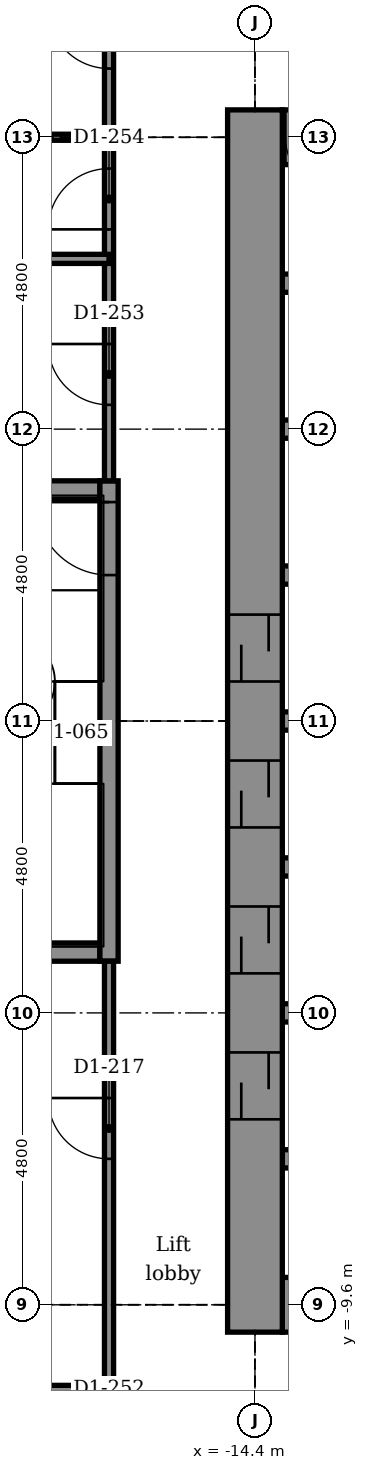
"""IFC4 building model, lengths in metres.
Left out: names, types, materials, properties, quantities, classifications, styles, units other than length and angle.
Written with IfcOpenShell. Run it as: python <this file> out.ifc"""

import sys

from ifc_helpers import new_model, si_unit, direction, frame, frame_2d, origin, place, context, subcontext, project, spatial, rectangle, extrude, element, fill, save


model = new_model("IFC4")
c1 = context("Model", 3, precision=1e-05, world=origin(), true_north=direction((0.0, 1.0)))
c2 = subcontext(c1, "Body", "Model", "MODEL_VIEW")
j1 = project(units=[si_unit("LENGTHUNIT", "METRE"), si_unit("PLANEANGLEUNIT", "RADIAN")], contexts=[c1])
p1 = place(None, origin())
s1 = spatial("IfcSite", under=j1, at=p1, CompositionType="ELEMENT")
p2 = place(p1, origin())
s2 = spatial("IfcBuilding", under=s1, at=p2, CompositionType="ELEMENT")
p3 = place(p2, frame((0.0, 0.0, 91.4)))
s3 = spatial("IfcBuildingStorey", under=s2, at=p3, CompositionType="ELEMENT", Elevation=91.4)
p4 = place(p3, frame((-13.95, -9.6, -0.2), z_axis=(0.0, 0.0, 1.0), x_axis=(1.0, 0.0, 0.0)))
e1 = element("IfcWall", 1, at=p4, inside=s3, PredefinedType="SHEAR", context=c2, shape_type="SweptSolid", body=[
    extrude(rectangle(XDim=3.9, YDim=0.9, at=frame_2d((1.95, 0.0))), origin(), (0.0, 0.0, 1.0), 4.5),
])
p5 = place(p4, frame((1.5, 0.0, 0.2)))
e2 = element("IfcOpeningElement", 2, at=p5, cuts=e1, PredefinedType="OPENING", context=c2, shape_type="SweptSolid", body=[
    extrude(rectangle(XDim=0.9, YDim=2.1, at=frame_2d((0.45, 1.05))), frame((0.0, 0.46, 0.0), z_axis=(0.0, -1.0, 0.0), x_axis=(1.0, 0.0, 0.0)), (0.0, 0.0, 1.0), 0.92),
])
for number, where, z_axis, x_axis in (
    (3, (-13.95, -7.2, -0.2), (0.0, 0.0, 1.0), (1.0, 0.0, 0.0)),
    (4, (-13.95, -4.8, -0.2), (0.0, 0.0, 1.0), (1.0, 0.0, 0.0)),
):
    element("IfcWall", number, at=place(p3, frame(where, z_axis=z_axis, x_axis=x_axis)), inside=s3, PredefinedType="STANDARD", context=c2, shape_type="SweptSolid", body=[
        extrude(rectangle(XDim=3.9, YDim=0.3, at=frame_2d((1.95, 0.0))), origin(), (0.0, 0.0, 1.0), 4.5),
    ])
p6 = place(p3, frame((-21.45, -3.8, -0.2), z_axis=(0.0, 0.0, 1.0), x_axis=(1.0, 0.0, 0.0)))
e5 = element("IfcWall", 5, at=p6, inside=s3, PredefinedType="STANDARD", context=c2, shape_type="SweptSolid", body=[
    extrude(rectangle(XDim=4.5, YDim=0.3, at=frame_2d((2.25, 0.0))), origin(), (0.0, 0.0, 1.0), 4.5),
])
for number, where, z_axis, x_axis in (
    (6, (-13.95, -2.4, -0.2), (0.0, 0.0, 1.0), (1.0, 0.0, 0.0)),
    (7, (-13.95, 0.0, -0.2), (0.0, 0.0, 1.0), (1.0, 0.0, 0.0)),
    (8, (-13.95, 2.4, -0.2), (0.0, 0.0, 1.0), (1.0, 0.0, 0.0)),
):
    element("IfcWall", number, at=place(p3, frame(where, z_axis=z_axis, x_axis=x_axis)), inside=s3, PredefinedType="STANDARD", context=c2, shape_type="SweptSolid", body=[
        extrude(rectangle(XDim=2.8, YDim=0.3, at=frame_2d((1.4, 0.0))), origin(), (0.0, 0.0, 1.0), 4.5),
    ])
p7 = place(p3, frame((-21.45, 3.8, -0.2), z_axis=(0.0, 0.0, 1.0), x_axis=(1.0, 0.0, 0.0)))
e9 = element("IfcWall", 9, at=p7, inside=s3, PredefinedType="STANDARD", context=c2, shape_type="SweptSolid", body=[
    extrude(rectangle(XDim=4.5, YDim=0.3, at=frame_2d((2.25, 0.0))), origin(), (0.0, 0.0, 1.0), 4.5),
])
for number, where, z_axis, x_axis in (
    (10, (-13.95, 4.8, -0.2), (0.0, 0.0, 1.0), (1.0, 0.0, 0.0)),
    (11, (-13.95, 7.2, -0.2), (0.0, 0.0, 1.0), (1.0, 0.0, 0.0)),
):
    element("IfcWall", number, at=place(p3, frame(where, z_axis=z_axis, x_axis=x_axis)), inside=s3, PredefinedType="STANDARD", context=c2, shape_type="SweptSolid", body=[
        extrude(rectangle(XDim=3.9, YDim=0.3, at=frame_2d((1.95, 0.0))), origin(), (0.0, 0.0, 1.0), 4.5),
    ])
p8 = place(p3, frame((-13.95, 9.6, -0.2), z_axis=(0.0, 0.0, 1.0), x_axis=(1.0, 0.0, 0.0)))
e12 = element("IfcWall", 12, at=p8, inside=s3, PredefinedType="SHEAR", context=c2, shape_type="SweptSolid", body=[
    extrude(rectangle(XDim=3.9, YDim=0.9, at=frame_2d((1.95, 0.0))), origin(), (0.0, 0.0, 1.0), 4.5),
])
p9 = place(p8, frame((0.05, 0.0, 0.2)))
e13 = element("IfcOpeningElement", 13, at=p9, cuts=e12, PredefinedType="OPENING", context=c2, shape_type="SweptSolid", body=[
    extrude(rectangle(XDim=0.9, YDim=2.1, at=frame_2d((0.45, 1.05))), frame((0.0, 0.46, 0.0), z_axis=(0.0, -1.0, 0.0), x_axis=(1.0, 0.0, 0.0)), (0.0, 0.0, 1.0), 0.92),
])
p10 = place(p8, frame((1.5, 0.0, 0.2)))
e14 = element("IfcOpeningElement", 14, at=p10, cuts=e12, PredefinedType="OPENING", context=c2, shape_type="SweptSolid", body=[
    extrude(rectangle(XDim=0.9, YDim=2.1, at=frame_2d((0.45, 1.05))), frame((0.0, 0.46, 0.0), z_axis=(0.0, -1.0, 0.0), x_axis=(1.0, 0.0, 0.0)), (0.0, 0.0, 1.0), 0.92),
])
p11 = place(p8, frame((2.95, 0.0, 0.2)))
e15 = element("IfcOpeningElement", 15, at=p11, cuts=e12, PredefinedType="OPENING", context=c2, shape_type="SweptSolid", body=[
    extrude(rectangle(XDim=0.9, YDim=2.1, at=frame_2d((0.45, 1.05))), frame((0.0, 0.46, 0.0), z_axis=(0.0, -1.0, 0.0), x_axis=(1.0, 0.0, 0.0)), (0.0, 0.0, 1.0), 0.92),
])
p12 = place(p3, frame((-16.8, -3.95, -0.2), z_axis=(0.0, 0.0, 1.0), x_axis=(0.0, 1.0, 0.0)))
e16 = element("IfcWall", 16, at=p12, inside=s3, PredefinedType="STANDARD", context=c2, shape_type="SweptSolid", body=[
    extrude(rectangle(XDim=7.9, YDim=0.3, at=frame_2d((3.95, 0.0))), origin(), (0.0, 0.0, 1.0), 4.5),
])
p13 = place(p12, frame((6.35, 0.0, 0.2)))
e17 = element("IfcOpeningElement", 17, at=p13, cuts=e16, PredefinedType="OPENING", context=c2, shape_type="SweptSolid", body=[
    extrude(rectangle(XDim=1.2, YDim=2.1, at=frame_2d((0.6, 1.05))), frame((0.0, 0.16, 0.0), z_axis=(0.0, -1.0, 0.0), x_axis=(1.0, 0.0, 0.0)), (0.0, 0.0, 1.0), 0.32),
])
p14 = place(p3, frame((-14.4, -10.05, -0.2), z_axis=(0.0, 0.0, 1.0), x_axis=(0.0, 1.0, 0.0)))
e18 = element("IfcWall", 18, at=p14, inside=s3, PredefinedType="SHEAR", context=c2, shape_type="SweptSolid", body=[
    extrude(rectangle(XDim=20.1, YDim=0.9, at=frame_2d((10.05, 0.0))), origin(), (0.0, 0.0, 1.0), 4.5),
])
p15 = place(p14, frame((3.5, 0.0, 0.2)))
e19 = element("IfcOpeningElement", 19, at=p15, cuts=e18, PredefinedType="OPENING", context=c2, shape_type="SweptSolid", body=[
    extrude(rectangle(XDim=1.1, YDim=2.1, at=frame_2d((0.55, 1.05))), frame((0.0, 0.46, 0.0), z_axis=(0.0, -1.0, 0.0), x_axis=(1.0, 0.0, 0.0)), (0.0, 0.0, 1.0), 0.92),
])
p16 = place(p14, frame((5.9, 0.0, 0.2)))
e20 = element("IfcOpeningElement", 20, at=p16, cuts=e18, PredefinedType="OPENING", context=c2, shape_type="SweptSolid", body=[
    extrude(rectangle(XDim=1.1, YDim=2.1, at=frame_2d((0.55, 1.05))), frame((0.0, 0.46, 0.0), z_axis=(0.0, -1.0, 0.0), x_axis=(1.0, 0.0, 0.0)), (0.0, 0.0, 1.0), 0.92),
])
p17 = place(p14, frame((8.3, 0.0, 0.2)))
e21 = element("IfcOpeningElement", 21, at=p17, cuts=e18, PredefinedType="OPENING", context=c2, shape_type="SweptSolid", body=[
    extrude(rectangle(XDim=1.1, YDim=2.1, at=frame_2d((0.55, 1.05))), frame((0.0, 0.46, 0.0), z_axis=(0.0, -1.0, 0.0), x_axis=(1.0, 0.0, 0.0)), (0.0, 0.0, 1.0), 0.92),
])
p18 = place(p14, frame((10.7, 0.0, 0.2)))
e22 = element("IfcOpeningElement", 22, at=p18, cuts=e18, PredefinedType="OPENING", context=c2, shape_type="SweptSolid", body=[
    extrude(rectangle(XDim=1.1, YDim=2.1, at=frame_2d((0.55, 1.05))), frame((0.0, 0.46, 0.0), z_axis=(0.0, -1.0, 0.0), x_axis=(1.0, 0.0, 0.0)), (0.0, 0.0, 1.0), 0.92),
])
p19 = place(p3, frame((-16.8, -13.0, 0.0), z_axis=(0.0, 0.0, 1.0), x_axis=(0.0, 1.0, 0.0)))
e23 = element("IfcWall", 23, at=p19, inside=s3, PredefinedType="PARTITIONING", context=c2, shape_type="SweptSolid", body=[
    extrude(rectangle(XDim=9.05, YDim=0.15, at=frame_2d((4.525, 0.0))), origin(), (0.0, 0.0, 1.0), 4.3),
])
p20 = place(p19, frame((0.515, 0.0, 0.0)))
e24 = element("IfcOpeningElement", 24, at=p20, cuts=e23, PredefinedType="OPENING", context=c2, shape_type="SweptSolid", body=[
    extrude(rectangle(XDim=1.0, YDim=2.1, at=frame_2d((0.5, 1.05))), frame((0.0, 0.085, 0.0), z_axis=(0.0, -1.0, 0.0), x_axis=(1.0, 0.0, 0.0)), (0.0, 0.0, 1.0), 0.17),
])
p21 = place(p19, frame((5.8, 0.0, 0.0)))
e25 = element("IfcOpeningElement", 25, at=p21, cuts=e23, PredefinedType="OPENING", context=c2, shape_type="SweptSolid", body=[
    extrude(rectangle(XDim=1.0, YDim=2.1, at=frame_2d((0.5, 1.05))), frame((0.0, 0.085, 0.0), z_axis=(0.0, -1.0, 0.0), x_axis=(1.0, 0.0, 0.0)), (0.0, 0.0, 1.0), 0.17),
])
p22 = place(p3, frame((-16.8, 3.95, 0.0), z_axis=(0.0, 0.0, 1.0), x_axis=(0.0, 1.0, 0.0)))
e26 = element("IfcWall", 26, at=p22, inside=s3, PredefinedType="PARTITIONING", context=c2, shape_type="SweptSolid", body=[
    extrude(rectangle(XDim=8.75, YDim=0.15, at=frame_2d((4.375, 0.0))), origin(), (0.0, 0.0, 1.0), 4.3),
])
p23 = place(p22, frame((1.25, 0.0, 0.0)))
e27 = element("IfcOpeningElement", 27, at=p23, cuts=e26, PredefinedType="OPENING", context=c2, shape_type="SweptSolid", body=[
    extrude(rectangle(XDim=1.0, YDim=2.1, at=frame_2d((0.5, 1.05))), frame((0.0, 0.085, 0.0), z_axis=(0.0, -1.0, 0.0), x_axis=(1.0, 0.0, 0.0)), (0.0, 0.0, 1.0), 0.17),
])
p24 = place(p22, frame((4.135, 0.0, 0.0)))
e28 = element("IfcOpeningElement", 28, at=p24, cuts=e26, PredefinedType="OPENING", context=c2, shape_type="SweptSolid", body=[
    extrude(rectangle(XDim=1.0, YDim=2.1, at=frame_2d((0.5, 1.05))), frame((0.0, 0.085, 0.0), z_axis=(0.0, -1.0, 0.0), x_axis=(1.0, 0.0, 0.0)), (0.0, 0.0, 1.0), 0.17),
])
p25 = place(p22, frame((6.78, 0.0, 0.0)))
e29 = element("IfcOpeningElement", 29, at=p25, cuts=e26, PredefinedType="OPENING", context=c2, shape_type="SweptSolid", body=[
    extrude(rectangle(XDim=1.0, YDim=2.1, at=frame_2d((0.5, 1.05))), frame((0.0, 0.085, 0.0), z_axis=(0.0, -1.0, 0.0), x_axis=(1.0, 0.0, 0.0)), (0.0, 0.0, 1.0), 0.17),
])
p26 = place(p3, frame((-25.378, -11.0, 0.0), z_axis=(0.0, 0.0, 1.0), x_axis=(1.0, 0.0, 0.0)))
e30 = element("IfcWall", 30, at=p26, inside=s3, PredefinedType="PARTITIONING", context=c2, shape_type="SweptSolid", body=[
    extrude(rectangle(XDim=8.578, YDim=0.15, at=frame_2d((4.289, 0.0))), origin(), (0.0, 0.0, 1.0), 4.3),
])
p27 = place(p3, frame((-27.342, 7.6, 0.0), z_axis=(0.0, 0.0, 1.0), x_axis=(1.0, 0.0, 0.0)))
e31 = element("IfcWall", 31, at=p27, inside=s3, PredefinedType="PARTITIONING", context=c2, shape_type="SweptSolid", body=[
    extrude(rectangle(XDim=10.542, YDim=0.15, at=frame_2d((5.271, 0.0))), origin(), (0.0, 0.0, 1.0), 4.3),
])
p28 = place(p3, frame((-18.7, 9.6, 0.0), z_axis=(0.0, 0.0, 1.0), x_axis=(1.0, 0.0, 0.0)))
e32 = element("IfcWall", 32, at=p28, inside=s3, PredefinedType="PARTITIONING", context=c2, shape_type="SweptSolid", body=[
    extrude(rectangle(XDim=1.9, YDim=0.1, at=frame_2d((0.95, 0.0))), origin(), (0.0, 0.0, 1.0), 3.692),
])
p29 = place(p21, origin())
e33 = element("IfcDoor", 33, at=p29, inside=s3, OperationType="SINGLE_SWING_RIGHT", PredefinedType="DOOR", context=c2, shape_type="SweptSolid", body=[
    extrude(rectangle(XDim=1.0, YDim=2.1, at=frame_2d((0.5, 1.05))), frame((0.0, 0.025, 0.0), z_axis=(0.0, -1.0, 0.0), x_axis=(1.0, 0.0, 0.0)), (0.0, 0.0, 1.0), 0.05),
])
fill(e25, e33)
p30 = place(p23, origin())
e34 = element("IfcDoor", 34, at=p30, inside=s3, OperationType="SINGLE_SWING_RIGHT", PredefinedType="DOOR", context=c2, shape_type="SweptSolid", body=[
    extrude(rectangle(XDim=1.0, YDim=2.1, at=frame_2d((0.5, 1.05))), frame((0.0, 0.025, 0.0), z_axis=(0.0, -1.0, 0.0), x_axis=(1.0, 0.0, 0.0)), (0.0, 0.0, 1.0), 0.05),
])
fill(e27, e34)
p31 = place(p24, origin())
e35 = element("IfcDoor", 35, at=p31, inside=s3, OperationType="SINGLE_SWING_LEFT", PredefinedType="DOOR", context=c2, shape_type="SweptSolid", body=[
    extrude(rectangle(XDim=1.0, YDim=2.1, at=frame_2d((0.5, 1.05))), frame((0.0, 0.025, 0.0), z_axis=(0.0, -1.0, 0.0), x_axis=(1.0, 0.0, 0.0)), (0.0, 0.0, 1.0), 0.05),
])
fill(e28, e35)
p32 = place(p25, origin())
e36 = element("IfcDoor", 36, at=p32, inside=s3, OperationType="SINGLE_SWING_RIGHT", PredefinedType="DOOR", context=c2, shape_type="SweptSolid", body=[
    extrude(rectangle(XDim=1.0, YDim=2.1, at=frame_2d((0.5, 1.05))), frame((0.0, 0.025, 0.0), z_axis=(0.0, -1.0, 0.0), x_axis=(1.0, 0.0, 0.0)), (0.0, 0.0, 1.0), 0.05),
])
fill(e29, e36)
p33 = place(p15, origin())
e37 = element("IfcDoor", 37, at=p33, inside=s3, OperationType="DOUBLE_DOOR_SLIDING", PredefinedType="DOOR", context=c2, shape_type="SweptSolid", body=[
    extrude(rectangle(XDim=1.1, YDim=2.1, at=frame_2d((0.55, 1.05))), frame((0.0, 0.025, 0.0), z_axis=(0.0, -1.0, 0.0), x_axis=(1.0, 0.0, 0.0)), (0.0, 0.0, 1.0), 0.05),
])
fill(e19, e37)
p34 = place(p16, origin())
e38 = element("IfcDoor", 38, at=p34, inside=s3, OperationType="DOUBLE_DOOR_SLIDING", PredefinedType="DOOR", context=c2, shape_type="SweptSolid", body=[
    extrude(rectangle(XDim=1.1, YDim=2.1, at=frame_2d((0.55, 1.05))), frame((0.0, 0.025, 0.0), z_axis=(0.0, -1.0, 0.0), x_axis=(1.0, 0.0, 0.0)), (0.0, 0.0, 1.0), 0.05),
])
fill(e20, e38)
p35 = place(p17, origin())
e39 = element("IfcDoor", 39, at=p35, inside=s3, OperationType="DOUBLE_DOOR_SLIDING", PredefinedType="DOOR", context=c2, shape_type="SweptSolid", body=[
    extrude(rectangle(XDim=1.1, YDim=2.1, at=frame_2d((0.55, 1.05))), frame((0.0, 0.025, 0.0), z_axis=(0.0, -1.0, 0.0), x_axis=(1.0, 0.0, 0.0)), (0.0, 0.0, 1.0), 0.05),
])
fill(e21, e39)
p36 = place(p18, origin())
e40 = element("IfcDoor", 40, at=p36, inside=s3, OperationType="DOUBLE_DOOR_SLIDING", PredefinedType="DOOR", context=c2, shape_type="SweptSolid", body=[
    extrude(rectangle(XDim=1.1, YDim=2.1, at=frame_2d((0.55, 1.05))), frame((0.0, 0.025, 0.0), z_axis=(0.0, -1.0, 0.0), x_axis=(1.0, 0.0, 0.0)), (0.0, 0.0, 1.0), 0.05),
])
fill(e22, e40)
p37 = place(p13, origin())
e41 = element("IfcDoor", 41, at=p37, inside=s3, OperationType="SINGLE_SWING_RIGHT", PredefinedType="DOOR", context=c2, shape_type="SweptSolid", body=[
    extrude(rectangle(XDim=1.2, YDim=2.1, at=frame_2d((0.6, 1.05))), frame((0.0, 0.025, 0.0), z_axis=(0.0, -1.0, 0.0), x_axis=(1.0, 0.0, 0.0)), (0.0, 0.0, 1.0), 0.05),
])
fill(e17, e41)
p38 = place(p9, frame((0.9, 0.0, 0.0), z_axis=(0.0, 0.0, 1.0), x_axis=(-1.0, 0.0, 0.0)))
e42 = element("IfcDoor", 42, at=p38, inside=s3, OperationType="SINGLE_SWING_RIGHT", PredefinedType="DOOR", context=c2, shape_type="SweptSolid", body=[
    extrude(rectangle(XDim=0.9, YDim=2.1, at=frame_2d((0.45, 1.05))), frame((0.0, 0.025, 0.0), z_axis=(0.0, -1.0, 0.0), x_axis=(1.0, 0.0, 0.0)), (0.0, 0.0, 1.0), 0.05),
])
fill(e13, e42)
save(model, sys.argv[1])
